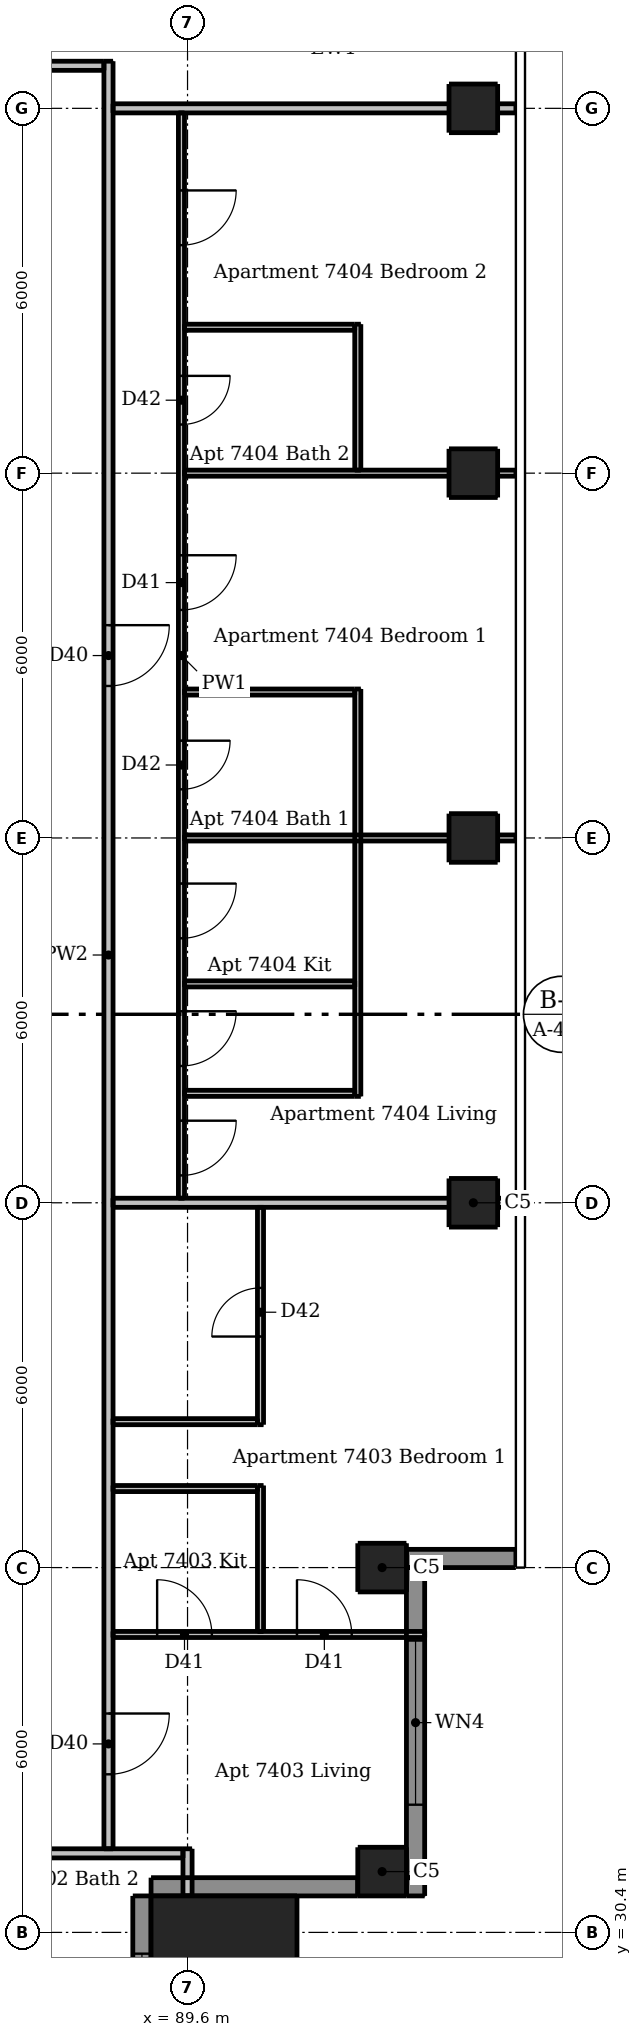
"""IFC4 building model, lengths in metres.
Left out: names, types, materials, properties, quantities, classifications, styles, units other than length and angle.
Written with IfcOpenShell. Run it as: python <this file> out.ifc"""

import sys

from ifc_helpers import new_model, si_unit, direction, frame, frame_2d, origin, origin_2d, place, context, subcontext, project, spatial, rectangle, extrude, element, fill, save


model = new_model("IFC4")
c1 = context("Model", 3, precision=1e-05, world=origin(), true_north=direction((0.0, 1.0)))
c2 = subcontext(c1, "Body", "Model", "MODEL_VIEW")
j1 = project(units=[si_unit("LENGTHUNIT", "METRE"), si_unit("PLANEANGLEUNIT", "RADIAN")], contexts=[c1])
p1 = place(None, origin())
s1 = spatial("IfcSite", under=j1, at=p1, CompositionType="ELEMENT")
p2 = place(p1, origin())
s2 = spatial("IfcBuilding", under=s1, at=p2, CompositionType="ELEMENT")
p3 = place(p2, frame((0.0, 0.0, 275.2)))
s3 = spatial("IfcBuildingStorey", under=s2, at=p3, CompositionType="ELEMENT", Elevation=275.2)
for number, where, z_axis, x_axis in (
    (1, (92.8, 31.4, 0.0), (0.0, 0.0, 1.0), (1.0, 0.0, 0.0)),
    (2, (92.8, 36.4, 0.0), (0.0, 0.0, 1.0), (1.0, 0.0, 0.0)),
    (3, (94.3, 42.4, 0.0), (0.0, 0.0, 1.0), (1.0, 0.0, 0.0)),
    (4, (94.3, 48.4, 0.0), (0.0, 0.0, 1.0), (1.0, 0.0, 0.0)),
    (5, (94.3, 54.4, 0.0), (0.0, 0.0, 1.0), (1.0, 0.0, 0.0)),
    (6, (94.3, 60.4, 0.0), (0.0, 0.0, 1.0), (1.0, 0.0, 0.0)),
):
    element("IfcColumn", number, at=place(p3, frame(where, z_axis=z_axis, x_axis=x_axis)), inside=s3, PredefinedType="COLUMN", context=c2, shape_type="SweptSolid", body=[
        extrude(rectangle(XDim=0.8, YDim=0.8, at=origin_2d()), origin(), (0.0, 0.0, 1.0), 3.05),
    ])
p4 = place(p3, frame((90.2, 29.8, 0.0), z_axis=(0.0, 0.0, 1.0), x_axis=(1.0, 0.0, 0.0)))
e7 = element("IfcColumn", 7, at=p4, inside=s3, PredefinedType="COLUMN", context=c2, shape_type="SweptSolid", body=[
    extrude(rectangle(XDim=2.4, YDim=2.4, at=origin_2d()), origin(), (0.0, 0.0, 1.0), 3.3),
])
p5 = place(p3, frame((88.85, 27.6, 0.0), z_axis=(0.0, 0.0, 1.0), x_axis=(0.0, 1.0, 0.0)))
e8 = element("IfcWall", 8, at=p5, inside=s3, PredefinedType="SOLIDWALL", context=c2, shape_type="SweptSolid", body=[
    extrude(rectangle(XDim=3.4, YDim=0.3, at=frame_2d((1.7, 0.0))), origin(), (0.0, 0.0, 1.0), 3.05),
])
p6 = place(p5, frame((0.95, 0.0, 0.9)))
e9 = element("IfcOpeningElement", 9, at=p6, cuts=e8, PredefinedType="OPENING", context=c2, shape_type="SweptSolid", body=[
    extrude(rectangle(XDim=1.5, YDim=1.5, at=frame_2d((0.75, 0.75))), frame((0.0, 0.16, 0.0), z_axis=(0.0, -1.0, 0.0), x_axis=(1.0, 0.0, 0.0)), (0.0, 0.0, 1.0), 0.32),
])
p7 = place(p3, frame((89.0, 31.15, 0.0), z_axis=(0.0, 0.0, 1.0), x_axis=(1.0, 0.0, 0.0)))
e10 = element("IfcWall", 10, at=p7, inside=s3, PredefinedType="SOLIDWALL", context=c2, shape_type="SweptSolid", body=[
    extrude(rectangle(XDim=3.4, YDim=0.3, at=frame_2d((1.7, 0.0))), origin(), (0.0, 0.0, 1.0), 3.05),
])
p8 = place(p3, frame((93.2, 31.15, 0.0), z_axis=(0.0, 0.0, 1.0), x_axis=(1.0, 0.0, 0.0)))
e11 = element("IfcWall", 11, at=p8, inside=s3, PredefinedType="SOLIDWALL", context=c2, shape_type="SweptSolid", body=[
    extrude(rectangle(XDim=0.3, YDim=0.3, at=frame_2d((0.15, 0.0))), origin(), (0.0, 0.0, 1.0), 3.05),
])
p9 = place(p3, frame((93.2, 36.55, 0.0), z_axis=(0.0, 0.0, 1.0), x_axis=(1.0, 0.0, 0.0)))
e12 = element("IfcWall", 12, at=p9, inside=s3, PredefinedType="SOLIDWALL", context=c2, shape_type="SweptSolid", body=[
    extrude(rectangle(XDim=1.8, YDim=0.3, at=frame_2d((0.9, 0.0))), origin(), (0.0, 0.0, 1.0), 3.05),
])
p10 = place(p3, frame((93.35, 31.3, 0.0), z_axis=(0.0, 0.0, 1.0), x_axis=(0.0, 1.0, 0.0)))
e13 = element("IfcWall", 13, at=p10, inside=s3, PredefinedType="SOLIDWALL", context=c2, shape_type="SweptSolid", body=[
    extrude(rectangle(XDim=5.1, YDim=0.3, at=frame_2d((2.55, 0.0))), origin(), (0.0, 0.0, 1.0), 3.05),
])
p11 = place(p10, frame((1.2, 0.0, 0.15)))
e14 = element("IfcOpeningElement", 14, at=p11, cuts=e13, PredefinedType="OPENING", context=c2, shape_type="SweptSolid", body=[
    extrude(rectangle(XDim=2.7, YDim=2.1, at=frame_2d((1.35, 1.05))), frame((0.0, 0.16, 0.0), z_axis=(0.0, -1.0, 0.0), x_axis=(1.0, 0.0, 0.0)), (0.0, 0.0, 1.0), 0.32),
])
p12 = place(p3, frame((89.5, 60.325, 0.0), z_axis=(0.0, 0.0, 1.0), x_axis=(0.0, -1.0, 0.0)))
e15 = element("IfcWall", 15, at=p12, inside=s3, PredefinedType="PARTITIONING", context=c2, shape_type="SweptSolid", body=[
    extrude(rectangle(XDim=17.85, YDim=0.1, at=frame_2d((8.925, 0.0))), origin(), (0.0, 0.0, 1.0), 3.05),
])
p13 = place(p12, frame((16.575, 0.0, 0.0)))
e16 = element("IfcOpeningElement", 16, at=p13, cuts=e15, PredefinedType="OPENING", context=c2, shape_type="SweptSolid", body=[
    extrude(rectangle(XDim=0.9, YDim=2.1, at=frame_2d((0.45, 1.05))), frame((0.0, 0.06, 0.0), z_axis=(0.0, -1.0, 0.0), x_axis=(1.0, 0.0, 0.0)), (0.0, 0.0, 1.0), 0.12),
])
p14 = place(p12, frame((12.675, 0.0, 0.0)))
e17 = element("IfcOpeningElement", 17, at=p14, cuts=e15, PredefinedType="OPENING", context=c2, shape_type="SweptSolid", body=[
    extrude(rectangle(XDim=0.9, YDim=2.1, at=frame_2d((0.45, 1.05))), frame((0.0, 0.06, 0.0), z_axis=(0.0, -1.0, 0.0), x_axis=(1.0, 0.0, 0.0)), (0.0, 0.0, 1.0), 0.12),
])
p15 = place(p12, frame((14.775, 0.0, 0.0)))
e18 = element("IfcOpeningElement", 18, at=p15, cuts=e15, PredefinedType="OPENING", context=c2, shape_type="SweptSolid", body=[
    extrude(rectangle(XDim=0.9, YDim=2.1, at=frame_2d((0.45, 1.05))), frame((0.0, 0.06, 0.0), z_axis=(0.0, -1.0, 0.0), x_axis=(1.0, 0.0, 0.0)), (0.0, 0.0, 1.0), 0.12),
])
p16 = place(p12, frame((7.275, 0.0, 0.0)))
e19 = element("IfcOpeningElement", 19, at=p16, cuts=e15, PredefinedType="OPENING", context=c2, shape_type="SweptSolid", body=[
    extrude(rectangle(XDim=0.9, YDim=2.1, at=frame_2d((0.45, 1.05))), frame((0.0, 0.06, 0.0), z_axis=(0.0, -1.0, 0.0), x_axis=(1.0, 0.0, 0.0)), (0.0, 0.0, 1.0), 0.12),
])
p17 = place(p12, frame((1.275, 0.0, 0.0)))
e20 = element("IfcOpeningElement", 20, at=p17, cuts=e15, PredefinedType="OPENING", context=c2, shape_type="SweptSolid", body=[
    extrude(rectangle(XDim=0.9, YDim=2.1, at=frame_2d((0.45, 1.05))), frame((0.0, 0.06, 0.0), z_axis=(0.0, -1.0, 0.0), x_axis=(1.0, 0.0, 0.0)), (0.0, 0.0, 1.0), 0.12),
])
p18 = place(p12, frame((10.325, 0.0, 0.0)))
e21 = element("IfcOpeningElement", 21, at=p18, cuts=e15, PredefinedType="OPENING", context=c2, shape_type="SweptSolid", body=[
    extrude(rectangle(XDim=0.8, YDim=2.1, at=frame_2d((0.4, 1.05))), frame((0.0, 0.06, 0.0), z_axis=(0.0, -1.0, 0.0), x_axis=(1.0, 0.0, 0.0)), (0.0, 0.0, 1.0), 0.12),
])
p19 = place(p12, frame((4.325, 0.0, 0.0)))
e22 = element("IfcOpeningElement", 22, at=p19, cuts=e15, PredefinedType="OPENING", context=c2, shape_type="SweptSolid", body=[
    extrude(rectangle(XDim=0.8, YDim=2.1, at=frame_2d((0.4, 1.05))), frame((0.0, 0.06, 0.0), z_axis=(0.0, -1.0, 0.0), x_axis=(1.0, 0.0, 0.0)), (0.0, 0.0, 1.0), 0.12),
])
p20 = place(p3, frame((90.8, 35.35, 0.0), z_axis=(0.0, 0.0, 1.0), x_axis=(0.0, 1.0, 0.0)))
e23 = element("IfcWall", 23, at=p20, inside=s3, PredefinedType="PARTITIONING", context=c2, shape_type="SweptSolid", body=[
    extrude(rectangle(XDim=2.4, YDim=0.1, at=frame_2d((1.2, 0.0))), origin(), (0.0, 0.0, 1.0), 3.05),
])
p21 = place(p3, frame((90.8, 38.75, 0.0), z_axis=(0.0, 0.0, 1.0), x_axis=(0.0, 1.0, 0.0)))
e24 = element("IfcWall", 24, at=p21, inside=s3, PredefinedType="PARTITIONING", context=c2, shape_type="SweptSolid", body=[
    extrude(rectangle(XDim=3.575, YDim=0.1, at=frame_2d((1.788, 0.0))), origin(), (0.0, 0.0, 1.0), 3.05),
])
p22 = place(p21, frame((1.45, 0.0, 0.0)))
e25 = element("IfcOpeningElement", 25, at=p22, cuts=e24, PredefinedType="OPENING", context=c2, shape_type="SweptSolid", body=[
    extrude(rectangle(XDim=0.8, YDim=2.1, at=frame_2d((0.4, 1.05))), frame((0.0, 0.06, 0.0), z_axis=(0.0, -1.0, 0.0), x_axis=(1.0, 0.0, 0.0)), (0.0, 0.0, 1.0), 0.12),
])
p23 = place(p3, frame((92.4, 44.15, 0.0), z_axis=(0.0, 0.0, 1.0), x_axis=(0.0, 1.0, 0.0)))
e26 = element("IfcWall", 26, at=p23, inside=s3, PredefinedType="PARTITIONING", context=c2, shape_type="SweptSolid", body=[
    extrude(rectangle(XDim=6.7, YDim=0.1, at=frame_2d((3.35, 0.0))), origin(), (0.0, 0.0, 1.0), 3.05),
])
p24 = place(p3, frame((92.4, 54.45, 0.0), z_axis=(0.0, 0.0, 1.0), x_axis=(0.0, 1.0, 0.0)))
e27 = element("IfcWall", 27, at=p24, inside=s3, PredefinedType="PARTITIONING", context=c2, shape_type="SweptSolid", body=[
    extrude(rectangle(XDim=2.4, YDim=0.1, at=frame_2d((1.2, 0.0))), origin(), (0.0, 0.0, 1.0), 3.05),
])
p25 = place(p3, frame((89.55, 56.8, 0.0), z_axis=(0.0, 0.0, 1.0), x_axis=(1.0, 0.0, 0.0)))
e28 = element("IfcWall", 28, at=p25, inside=s3, PredefinedType="PARTITIONING", context=c2, shape_type="SweptSolid", body=[
    extrude(rectangle(XDim=2.8, YDim=0.1, at=frame_2d((1.4, 0.0))), origin(), (0.0, 0.0, 1.0), 3.05),
])
p26 = place(p3, frame((89.55, 54.4, 0.0), z_axis=(0.0, 0.0, 1.0), x_axis=(1.0, 0.0, 0.0)))
e29 = element("IfcWall", 29, at=p26, inside=s3, PredefinedType="PARTITIONING", context=c2, shape_type="SweptSolid", body=[
    extrude(rectangle(XDim=5.45, YDim=0.1, at=frame_2d((2.725, 0.0))), origin(), (0.0, 0.0, 1.0), 2.589),
])
p27 = place(p3, frame((89.55, 50.8, 0.0), z_axis=(0.0, 0.0, 1.0), x_axis=(1.0, 0.0, 0.0)))
e30 = element("IfcWall", 30, at=p27, inside=s3, PredefinedType="PARTITIONING", context=c2, shape_type="SweptSolid", body=[
    extrude(rectangle(XDim=2.8, YDim=0.1, at=frame_2d((1.4, 0.0))), origin(), (0.0, 0.0, 1.0), 3.05),
])
p28 = place(p3, frame((89.55, 48.4, 0.0), z_axis=(0.0, 0.0, 1.0), x_axis=(1.0, 0.0, 0.0)))
e31 = element("IfcWall", 31, at=p28, inside=s3, PredefinedType="PARTITIONING", context=c2, shape_type="SweptSolid", body=[
    extrude(rectangle(XDim=5.45, YDim=0.1, at=frame_2d((2.725, 0.0))), origin(), (0.0, 0.0, 1.0), 2.589),
])
for number, where, z_axis, x_axis in (
    (32, (89.55, 46.0, 0.0), (0.0, 0.0, 1.0), (1.0, 0.0, 0.0)),
    (33, (89.55, 44.2, 0.0), (0.0, 0.0, 1.0), (1.0, 0.0, 0.0)),
):
    element("IfcWall", number, at=place(p3, frame(where, z_axis=z_axis, x_axis=x_axis)), inside=s3, PredefinedType="PARTITIONING", context=c2, shape_type="SweptSolid", body=[
        extrude(rectangle(XDim=2.8, YDim=0.1, at=frame_2d((1.4, 0.0))), origin(), (0.0, 0.0, 1.0), 3.05),
    ])
for number, where, z_axis, x_axis in (
    (34, (88.375, 38.8, 0.0), (0.0, 0.0, 1.0), (1.0, 0.0, 0.0)),
    (35, (88.375, 37.7, 0.0), (0.0, 0.0, 1.0), (1.0, 0.0, 0.0)),
):
    element("IfcWall", number, at=place(p3, frame(where, z_axis=z_axis, x_axis=x_axis)), inside=s3, PredefinedType="PARTITIONING", context=c2, shape_type="SweptSolid", body=[
        extrude(rectangle(XDim=2.375, YDim=0.1, at=frame_2d((1.188, 0.0))), origin(), (0.0, 0.0, 1.0), 3.05),
    ])
p29 = place(p3, frame((88.375, 35.3, 0.0), z_axis=(0.0, 0.0, 1.0), x_axis=(1.0, 0.0, 0.0)))
e36 = element("IfcWall", 36, at=p29, inside=s3, PredefinedType="PARTITIONING", context=c2, shape_type="SweptSolid", body=[
    extrude(rectangle(XDim=5.125, YDim=0.1, at=frame_2d((2.562, 0.0))), origin(), (0.0, 0.0, 1.0), 3.05),
])
p30 = place(p29, frame((0.725, 0.0, 0.0)))
e37 = element("IfcOpeningElement", 37, at=p30, cuts=e36, PredefinedType="OPENING", context=c2, shape_type="SweptSolid", body=[
    extrude(rectangle(XDim=0.9, YDim=2.1, at=frame_2d((0.45, 1.05))), frame((0.0, 0.06, 0.0), z_axis=(0.0, -1.0, 0.0), x_axis=(1.0, 0.0, 0.0)), (0.0, 0.0, 1.0), 0.12),
])
p31 = place(p29, frame((3.025, 0.0, 0.0)))
e38 = element("IfcOpeningElement", 38, at=p31, cuts=e36, PredefinedType="OPENING", context=c2, shape_type="SweptSolid", body=[
    extrude(rectangle(XDim=0.9, YDim=2.1, at=frame_2d((0.45, 1.05))), frame((0.0, 0.06, 0.0), z_axis=(0.0, -1.0, 0.0), x_axis=(1.0, 0.0, 0.0)), (0.0, 0.0, 1.0), 0.12),
])
p32 = place(p3, frame((88.3, 61.175, 0.0), z_axis=(0.0, 0.0, 1.0), x_axis=(0.0, -1.0, 0.0)))
e39 = element("IfcWall", 39, at=p32, inside=s3, PredefinedType="PARTITIONING", context=c2, shape_type="SweptSolid", body=[
    extrude(rectangle(XDim=29.4, YDim=0.15, at=frame_2d((14.7, 0.0))), origin(), (0.0, 0.0, 1.0), 3.05),
])
p33 = place(p32, frame((27.175, 0.0, 0.0)))
e40 = element("IfcOpeningElement", 40, at=p33, cuts=e39, PredefinedType="OPENING", context=c2, shape_type="SweptSolid", body=[
    extrude(rectangle(XDim=1.0, YDim=2.1, at=frame_2d((0.5, 1.05))), frame((0.0, 0.085, 0.0), z_axis=(0.0, -1.0, 0.0), x_axis=(1.0, 0.0, 0.0)), (0.0, 0.0, 1.0), 0.17),
])
p34 = place(p32, frame((9.275, 0.0, 0.0)))
e41 = element("IfcOpeningElement", 41, at=p34, cuts=e39, PredefinedType="OPENING", context=c2, shape_type="SweptSolid", body=[
    extrude(rectangle(XDim=1.0, YDim=2.1, at=frame_2d((0.5, 1.05))), frame((0.0, 0.085, 0.0), z_axis=(0.0, -1.0, 0.0), x_axis=(1.0, 0.0, 0.0)), (0.0, 0.0, 1.0), 0.17),
])
p35 = place(p3, frame((89.6, 31.0, 0.0), z_axis=(0.0, 0.0, 1.0), x_axis=(0.0, 1.0, 0.0)))
e42 = element("IfcWall", 42, at=p35, inside=s3, PredefinedType="PARTITIONING", context=c2, shape_type="SweptSolid", body=[
    extrude(rectangle(XDim=0.775, YDim=0.15, at=frame_2d((0.387, 0.0))), origin(), (0.0, 0.0, 1.0), 3.05),
])
p36 = place(p3, frame((58.975, 61.1, 0.0), z_axis=(0.0, 0.0, 1.0), x_axis=(1.0, 0.0, 0.0)))
e43 = element("IfcWall", 43, at=p36, inside=s3, PredefinedType="PARTITIONING", context=c2, shape_type="SweptSolid", body=[
    extrude(rectangle(XDim=29.25, YDim=0.15, at=frame_2d((14.625, 0.0))), origin(), (0.0, 0.0, 1.0), 3.05),
])
p37 = place(p36, frame((9.125, 0.0, 0.0)))
e44 = element("IfcOpeningElement", 44, at=p37, cuts=e43, PredefinedType="OPENING", context=c2, shape_type="SweptSolid", body=[
    extrude(rectangle(XDim=1.0, YDim=2.1, at=frame_2d((0.5, 1.05))), frame((0.0, 0.085, 0.0), z_axis=(0.0, -1.0, 0.0), x_axis=(1.0, 0.0, 0.0)), (0.0, 0.0, 1.0), 0.17),
])
p38 = place(p36, frame((26.475, 0.0, 0.0)))
e45 = element("IfcOpeningElement", 45, at=p38, cuts=e43, PredefinedType="OPENING", context=c2, shape_type="SweptSolid", body=[
    extrude(rectangle(XDim=1.0, YDim=2.1, at=frame_2d((0.5, 1.05))), frame((0.0, 0.085, 0.0), z_axis=(0.0, -1.0, 0.0), x_axis=(1.0, 0.0, 0.0)), (0.0, 0.0, 1.0), 0.17),
])
p39 = place(p3, frame((88.375, 60.4, 0.0), z_axis=(0.0, 0.0, 1.0), x_axis=(1.0, 0.0, 0.0)))
e46 = element("IfcWall", 46, at=p39, inside=s3, PredefinedType="PARTITIONING", context=c2, shape_type="SweptSolid", body=[
    extrude(rectangle(XDim=6.625, YDim=0.15, at=frame_2d((3.312, 0.0))), origin(), (0.0, 0.0, 1.0), 2.647),
])
p40 = place(p3, frame((88.375, 42.4, 0.0), z_axis=(0.0, 0.0, 1.0), x_axis=(1.0, 0.0, 0.0)))
e47 = element("IfcWall", 47, at=p40, inside=s3, PredefinedType="PARTITIONING", context=c2, shape_type="SweptSolid", body=[
    extrude(rectangle(XDim=6.625, YDim=0.15, at=frame_2d((3.312, 0.0))), origin(), (0.0, 0.0, 1.0), 2.589),
])
p41 = place(p3, frame((89.525, 31.7, 0.0), z_axis=(0.0, 0.0, 1.0), x_axis=(-1.0, 0.0, 0.0)))
e48 = element("IfcWall", 48, at=p41, inside=s3, PredefinedType="PARTITIONING", context=c2, shape_type="SweptSolid", body=[
    extrude(rectangle(XDim=30.55, YDim=0.15, at=frame_2d((15.275, 0.0))), origin(), (0.0, 0.0, 1.0), 3.05),
])
p42 = place(p41, frame((26.775, 0.0, 0.0)))
e49 = element("IfcOpeningElement", 49, at=p42, cuts=e48, PredefinedType="OPENING", context=c2, shape_type="SweptSolid", body=[
    extrude(rectangle(XDim=1.0, YDim=2.1, at=frame_2d((0.5, 1.05))), frame((0.0, 0.085, 0.0), z_axis=(0.0, -1.0, 0.0), x_axis=(1.0, 0.0, 0.0)), (0.0, 0.0, 1.0), 0.17),
])
p43 = place(p41, frame((9.363, 0.0, 0.0)))
e50 = element("IfcOpeningElement", 50, at=p43, cuts=e48, PredefinedType="OPENING", context=c2, shape_type="SweptSolid", body=[
    extrude(rectangle(XDim=1.0, YDim=2.1, at=frame_2d((0.5, 1.05))), frame((0.0, 0.085, 0.0), z_axis=(0.0, -1.0, 0.0), x_axis=(1.0, 0.0, 0.0)), (0.0, 0.0, 1.0), 0.17),
])
p44 = place(p6, origin())
e51 = element("IfcWindow", 51, at=p44, inside=s3, PartitioningType="DOUBLE_PANEL_VERTICAL", PredefinedType="WINDOW", context=c2, shape_type="SweptSolid", body=[
    extrude(rectangle(XDim=1.5, YDim=1.5, at=frame_2d((0.75, 0.75))), frame((0.0, 0.03, 0.0), z_axis=(0.0, -1.0, 0.0), x_axis=(1.0, 0.0, 0.0)), (0.0, 0.0, 1.0), 0.06),
])
fill(e9, e51)
p45 = place(p11, origin())
e52 = element("IfcWindow", 52, at=p45, inside=s3, PartitioningType="DOUBLE_PANEL_VERTICAL", PredefinedType="WINDOW", context=c2, shape_type="SweptSolid", body=[
    extrude(rectangle(XDim=2.7, YDim=2.1, at=frame_2d((1.35, 1.05))), frame((0.0, 0.03, 0.0), z_axis=(0.0, -1.0, 0.0), x_axis=(1.0, 0.0, 0.0)), (0.0, 0.0, 1.0), 0.06),
])
fill(e14, e52)
p46 = place(p33, origin())
e53 = element("IfcDoor", 53, at=p46, inside=s3, OperationType="SINGLE_SWING_LEFT", PredefinedType="DOOR", context=c2, shape_type="SweptSolid", body=[
    extrude(rectangle(XDim=1.0, YDim=2.1, at=frame_2d((0.5, 1.05))), frame((0.0, 0.025, 0.0), z_axis=(0.0, -1.0, 0.0), x_axis=(1.0, 0.0, 0.0)), (0.0, 0.0, 1.0), 0.05),
])
fill(e40, e53)
p47 = place(p30, origin())
e54 = element("IfcDoor", 54, at=p47, inside=s3, OperationType="SINGLE_SWING_LEFT", PredefinedType="DOOR", context=c2, shape_type="SweptSolid", body=[
    extrude(rectangle(XDim=0.9, YDim=2.1, at=frame_2d((0.45, 1.05))), frame((0.0, 0.025, 0.0), z_axis=(0.0, -1.0, 0.0), x_axis=(1.0, 0.0, 0.0)), (0.0, 0.0, 1.0), 0.05),
])
fill(e37, e54)
p48 = place(p31, origin())
e55 = element("IfcDoor", 55, at=p48, inside=s3, OperationType="SINGLE_SWING_LEFT", PredefinedType="DOOR", context=c2, shape_type="SweptSolid", body=[
    extrude(rectangle(XDim=0.9, YDim=2.1, at=frame_2d((0.45, 1.05))), frame((0.0, 0.025, 0.0), z_axis=(0.0, -1.0, 0.0), x_axis=(1.0, 0.0, 0.0)), (0.0, 0.0, 1.0), 0.05),
])
fill(e38, e55)
p49 = place(p22, origin())
e56 = element("IfcDoor", 56, at=p49, inside=s3, OperationType="SINGLE_SWING_LEFT", PredefinedType="DOOR", context=c2, shape_type="SweptSolid", body=[
    extrude(rectangle(XDim=0.8, YDim=2.1, at=frame_2d((0.4, 1.05))), frame((0.0, 0.025, 0.0), z_axis=(0.0, -1.0, 0.0), x_axis=(1.0, 0.0, 0.0)), (0.0, 0.0, 1.0), 0.05),
])
fill(e25, e56)
p50 = place(p34, origin())
e57 = element("IfcDoor", 57, at=p50, inside=s3, OperationType="SINGLE_SWING_LEFT", PredefinedType="DOOR", context=c2, shape_type="SweptSolid", body=[
    extrude(rectangle(XDim=1.0, YDim=2.1, at=frame_2d((0.5, 1.05))), frame((0.0, 0.025, 0.0), z_axis=(0.0, -1.0, 0.0), x_axis=(1.0, 0.0, 0.0)), (0.0, 0.0, 1.0), 0.05),
])
fill(e41, e57)
p51 = place(p13, origin())
e58 = element("IfcDoor", 58, at=p51, inside=s3, OperationType="SINGLE_SWING_LEFT", PredefinedType="DOOR", context=c2, shape_type="SweptSolid", body=[
    extrude(rectangle(XDim=0.9, YDim=2.1, at=frame_2d((0.45, 1.05))), frame((0.0, 0.025, 0.0), z_axis=(0.0, -1.0, 0.0), x_axis=(1.0, 0.0, 0.0)), (0.0, 0.0, 1.0), 0.05),
])
fill(e16, e58)
p52 = place(p14, origin())
e59 = element("IfcDoor", 59, at=p52, inside=s3, OperationType="SINGLE_SWING_LEFT", PredefinedType="DOOR", context=c2, shape_type="SweptSolid", body=[
    extrude(rectangle(XDim=0.9, YDim=2.1, at=frame_2d((0.45, 1.05))), frame((0.0, 0.025, 0.0), z_axis=(0.0, -1.0, 0.0), x_axis=(1.0, 0.0, 0.0)), (0.0, 0.0, 1.0), 0.05),
])
fill(e17, e59)
p53 = place(p15, origin())
e60 = element("IfcDoor", 60, at=p53, inside=s3, OperationType="SINGLE_SWING_LEFT", PredefinedType="DOOR", context=c2, shape_type="SweptSolid", body=[
    extrude(rectangle(XDim=0.9, YDim=2.1, at=frame_2d((0.45, 1.05))), frame((0.0, 0.025, 0.0), z_axis=(0.0, -1.0, 0.0), x_axis=(1.0, 0.0, 0.0)), (0.0, 0.0, 1.0), 0.05),
])
fill(e18, e60)
p54 = place(p16, origin())
e61 = element("IfcDoor", 61, at=p54, inside=s3, OperationType="SINGLE_SWING_LEFT", PredefinedType="DOOR", context=c2, shape_type="SweptSolid", body=[
    extrude(rectangle(XDim=0.9, YDim=2.1, at=frame_2d((0.45, 1.05))), frame((0.0, 0.025, 0.0), z_axis=(0.0, -1.0, 0.0), x_axis=(1.0, 0.0, 0.0)), (0.0, 0.0, 1.0), 0.05),
])
fill(e19, e61)
p55 = place(p17, origin())
e62 = element("IfcDoor", 62, at=p55, inside=s3, OperationType="SINGLE_SWING_LEFT", PredefinedType="DOOR", context=c2, shape_type="SweptSolid", body=[
    extrude(rectangle(XDim=0.9, YDim=2.1, at=frame_2d((0.45, 1.05))), frame((0.0, 0.025, 0.0), z_axis=(0.0, -1.0, 0.0), x_axis=(1.0, 0.0, 0.0)), (0.0, 0.0, 1.0), 0.05),
])
fill(e20, e62)
p56 = place(p18, origin())
e63 = element("IfcDoor", 63, at=p56, inside=s3, OperationType="SINGLE_SWING_LEFT", PredefinedType="DOOR", context=c2, shape_type="SweptSolid", body=[
    extrude(rectangle(XDim=0.8, YDim=2.1, at=frame_2d((0.4, 1.05))), frame((0.0, 0.025, 0.0), z_axis=(0.0, -1.0, 0.0), x_axis=(1.0, 0.0, 0.0)), (0.0, 0.0, 1.0), 0.05),
])
fill(e21, e63)
p57 = place(p19, origin())
e64 = element("IfcDoor", 64, at=p57, inside=s3, OperationType="SINGLE_SWING_LEFT", PredefinedType="DOOR", context=c2, shape_type="SweptSolid", body=[
    extrude(rectangle(XDim=0.8, YDim=2.1, at=frame_2d((0.4, 1.05))), frame((0.0, 0.025, 0.0), z_axis=(0.0, -1.0, 0.0), x_axis=(1.0, 0.0, 0.0)), (0.0, 0.0, 1.0), 0.05),
])
fill(e22, e64)
save(model, sys.argv[1])
